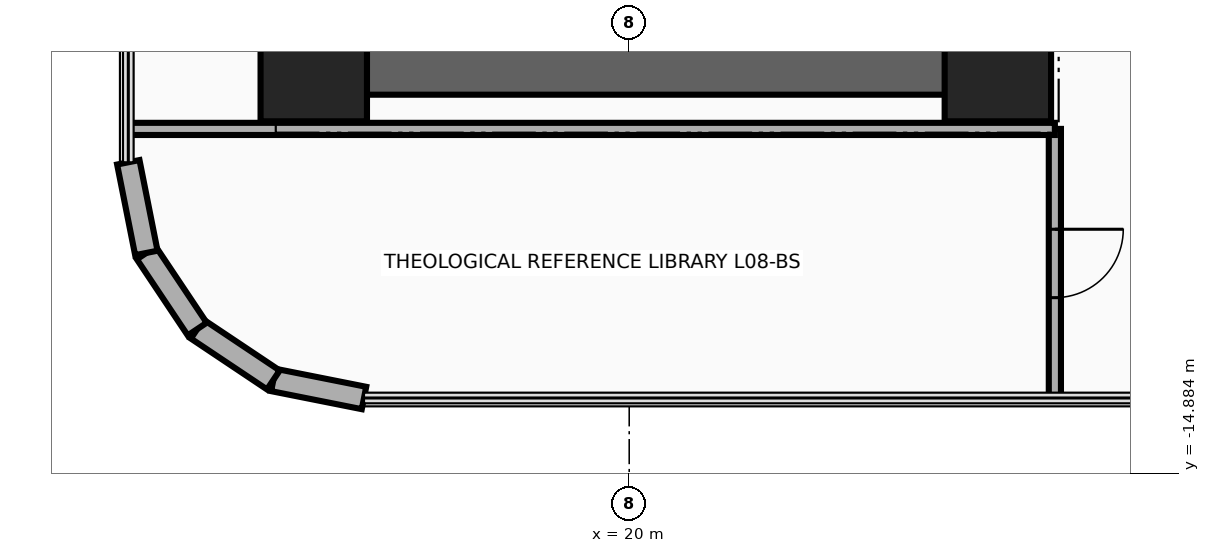
"""IFC4 building model, lengths in metres.
Left out: names, types, materials, properties, quantities, classifications, styles, units other than length and angle.
Written with IfcOpenShell. Run it as: python <this file> out.ifc"""

import sys

from ifc_helpers import new_model, si_unit, direction, frame, frame_2d, origin, origin_2d, place, context, subcontext, project, spatial, rectangle, extrude, source, transform, mapped, element, fill, save


model = new_model("IFC4")
c1 = context("Model", 3, precision=1e-05, world=origin(), true_north=direction((0.0, 1.0)))
c2 = subcontext(c1, "Body", "Model", "MODEL_VIEW")
j1 = project(units=[si_unit("LENGTHUNIT", "METRE"), si_unit("PLANEANGLEUNIT", "RADIAN")], contexts=[c1])
p1 = place(None, origin())
s1 = spatial("IfcSite", under=j1, at=p1, CompositionType="ELEMENT")
p2 = place(p1, origin())
s2 = spatial("IfcBuilding", under=s1, at=p2, CompositionType="ELEMENT")
p3 = place(p2, frame((0.0, 0.0, 37.1)))
s3 = spatial("IfcBuildingStorey", under=s2, at=p3, CompositionType="ELEMENT", Elevation=37.1)
p4 = place(p3, frame((24.85, -9.9, 0.0), z_axis=(0.0, 0.0, 1.0), x_axis=(0.0, 1.0, 0.0)))
e1 = element("IfcWall", 1, at=p4, inside=s3, PredefinedType="SHEAR", context=c2, shape_type="SweptSolid", body=[
    extrude(rectangle(XDim=8.95, YDim=0.7, at=frame_2d((4.475, 0.0))), origin(), (0.0, 0.0, 1.0), 3.46),
])
p5 = place(p3, frame((15.85, -9.55, 0.0), z_axis=(0.0, 0.0, 1.0), x_axis=(1.0, 0.0, 0.0)))
e2 = element("IfcWall", 2, at=p5, inside=s3, PredefinedType="SHEAR", context=c2, shape_type="SweptSolid", body=[
    extrude(rectangle(XDim=9.0, YDim=0.7, at=frame_2d((4.5, 0.0))), origin(), (0.0, 0.0, 1.0), 3.46),
])
m1 = source(origin(), c2, "Body", "SweptSolid", [
    extrude(rectangle(XDim=1.4, YDim=1.4, at=origin_2d()), origin(), (0.0, 0.0, 1.0), 3.7),
])
for number, where, z_axis, x_axis in (
    (3, (15.85, -9.55, 0.0), (0.0, 0.0, 1.0), (1.0, 0.0, 0.0)),
    (4, (24.85, -9.55, 0.0), (0.0, 0.0, 1.0), (1.0, 0.0, 0.0)),
):
    element("IfcColumn", number, at=place(p3, frame(where, z_axis=z_axis, x_axis=x_axis)), inside=s3, PredefinedType="COLUMN", context=c2, shape_type="MappedRepresentation", body=[
        mapped(m1, transform((0.0, 0.0, 0.0), x_axis=(1.0, 0.0, 0.0), y_axis=(0.0, 1.0, 0.0), z_axis=(0.0, 0.0, 1.0), scale=1.0)),
    ])
p6 = place(p3, frame((16.511, -13.89, 0.0), z_axis=(0.0, 0.0, 1.0), x_axis=(-0.980804027463, 0.194996050505, 0.0)))
e5 = element("IfcWall", 5, at=p6, inside=s3, PredefinedType="SOLIDWALL", context=c2, shape_type="SweptSolid", body=[
    extrude(rectangle(XDim=1.216, YDim=0.3, at=frame_2d((0.608, 0.0))), origin(), (0.0, 0.0, 1.0), 3.46),
])
for number, where, z_axis, x_axis in (
    (6, (15.318, -13.653, 0.0), (0.0, 0.0, 1.0), (-0.831, 0.556, 0.0)),
    (7, (14.317, -12.983, 0.0), (0.0, 0.0, 1.0), (-0.556, 0.831, 0.0)),
):
    element("IfcWall", number, at=place(p3, frame(where, z_axis=z_axis, x_axis=x_axis)), inside=s3, PredefinedType="SOLIDWALL", context=c2, shape_type="SweptSolid", body=[
        extrude(rectangle(XDim=1.205, YDim=0.3, at=frame_2d((0.603, 0.0))), origin(), (0.0, 0.0, 1.0), 3.46),
    ])
p7 = place(p3, frame((13.647, -11.982, 0.0), z_axis=(0.0, 0.0, 1.0), x_axis=(-0.195189223115, 0.980765602568, 0.0)))
e8 = element("IfcWall", 8, at=p7, inside=s3, PredefinedType="SOLIDWALL", context=c2, shape_type="SweptSolid", body=[
    extrude(rectangle(XDim=1.216, YDim=0.3, at=frame_2d((0.608, 0.0))), origin(), (0.0, 0.0, 1.0), 3.46),
])
p8 = place(p3, frame((25.6, -13.89, 0.0), z_axis=(0.0, 0.0, 1.0), x_axis=(0.0, 1.0, 0.0)))
e9 = element("IfcWall", 9, at=p8, inside=s3, PredefinedType="PARTITIONING", context=c2, shape_type="SweptSolid", body=[
    extrude(rectangle(XDim=3.54, YDim=0.16, at=frame_2d((1.77, 0.0))), origin(), (0.0, 0.0, 1.0), 3.46),
])
p9 = place(p8, frame((1.32, 0.0, 0.0)))
e10 = element("IfcOpeningElement", 10, at=p9, cuts=e9, PredefinedType="OPENING", context=c2, shape_type="SweptSolid", body=[
    extrude(rectangle(XDim=0.9, YDim=2.1, at=frame_2d((0.45, 1.05))), frame((0.0, 0.095, 0.0), z_axis=(0.0, -1.0, 0.0), x_axis=(1.0, 0.0, 0.0)), (0.0, 0.0, 1.0), 0.19),
])
p10 = place(p3, frame((13.41, -10.35, 0.0), z_axis=(0.0, 0.0, 1.0), x_axis=(1.0, 0.0, 0.0)))
e11 = element("IfcWall", 11, at=p10, inside=s3, PredefinedType="PARTITIONING", context=c2, shape_type="SweptSolid", body=[
    extrude(rectangle(XDim=12.19, YDim=0.16, at=frame_2d((6.095, 0.0))), origin(), (0.0, 0.0, 1.0), 3.46),
])
p11 = place(p9, frame((0.9, 0.0, 0.0), z_axis=(0.0, 0.0, 1.0), x_axis=(-1.0, 0.0, 0.0)))
e12 = element("IfcDoor", 12, at=p11, inside=s3, OperationType="SINGLE_SWING_LEFT", PredefinedType="DOOR", context=c2, shape_type="SweptSolid", body=[
    extrude(rectangle(XDim=0.9, YDim=2.1, at=frame_2d((0.45, 1.05))), frame((0.0, 0.025, 0.0), z_axis=(0.0, -1.0, 0.0), x_axis=(1.0, 0.0, 0.0)), (0.0, 0.0, 1.0), 0.05),
])
fill(e10, e12)
save(model, sys.argv[1])
